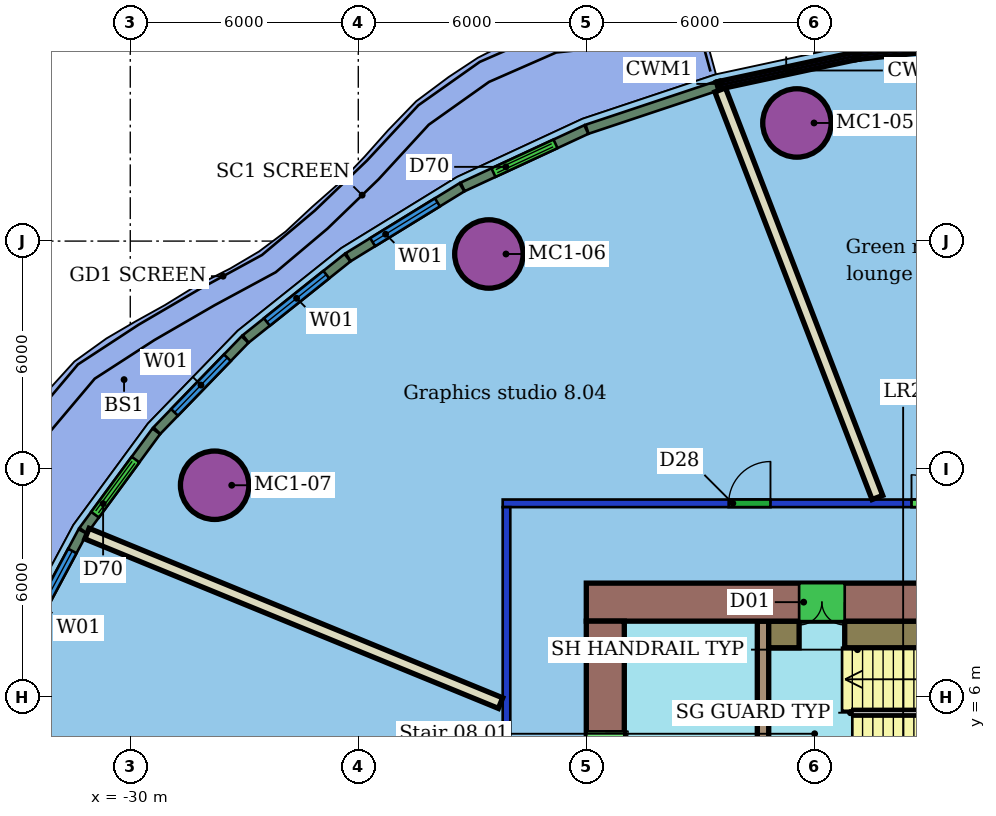
"""IFC4 building model, lengths in metres.
Left out: names, types, materials, properties, quantities, classifications, styles, units other than length and angle.
Written with IfcOpenShell. Run it as: python <this file> out.ifc"""

import sys

from ifc_helpers import new_model, si_unit, direction, frame, frame_2d, origin, origin_2d, place, context, subcontext, project, spatial, rectangle, hollow_circle, extrude, element, fill, save


model = new_model("IFC4")
c1 = context("Model", 3, precision=1e-05, world=origin(), true_north=direction((0.0, 1.0)))
c2 = subcontext(c1, "Body", "Model", "MODEL_VIEW")
j1 = project(units=[si_unit("LENGTHUNIT", "METRE"), si_unit("PLANEANGLEUNIT", "RADIAN")], contexts=[c1])
p1 = place(None, origin())
s1 = spatial("IfcSite", under=j1, at=p1, CompositionType="ELEMENT")
p2 = place(p1, origin())
s2 = spatial("IfcBuilding", under=s1, at=p2, CompositionType="ELEMENT")
p3 = place(p2, frame((0.0, 0.0, 47.1)))
s3 = spatial("IfcBuildingStorey", under=s2, at=p3, CompositionType="ELEMENT", Elevation=47.1)
for number, where, z_axis, x_axis in (
    (1, (-12.458, 21.108, 0.0), (0.0, 0.0, 1.0), (1.0, 0.0, 0.0)),
    (2, (-20.563, 17.66, 0.0), (0.0, 0.0, 1.0), (1.0, 0.0, 0.0)),
    (3, (-27.78, 11.576, 0.0), (0.0, 0.0, 1.0), (1.0, 0.0, 0.0)),
):
    element("IfcColumn", number, at=place(p3, frame(where, z_axis=z_axis, x_axis=x_axis)), inside=s3, PredefinedType="COLUMN", context=c2, shape_type="SweptSolid", body=[
        extrude(hollow_circle(Radius=0.9, WallThickness=0.06, at=origin_2d()), origin(), (0.0, 0.0, 1.0), 3.55),
    ])
p4 = place(p3, frame((-20.1, -11.0, 0.0), z_axis=(0.0, 0.0, 1.0), x_axis=(0.0, 1.0, 0.0)))
e4 = element("IfcWall", 4, at=p4, inside=s3, PredefinedType="PARTITIONING", context=c2, shape_type="SweptSolid", body=[
    extrude(rectangle(XDim=22.0, YDim=0.2, at=frame_2d((11.0, 0.0))), origin(), (0.0, 0.0, 1.0), 2.85),
])
p5 = place(p4, frame((8.49, 0.0, 0.0)))
e5 = element("IfcOpeningElement", 5, at=p5, cuts=e4, PredefinedType="OPENING", context=c2, shape_type="SweptSolid", body=[
    extrude(rectangle(XDim=1.8, YDim=2.1, at=frame_2d((0.9, 1.05))), frame((0.0, 0.11, 0.0), z_axis=(0.0, -1.0, 0.0), x_axis=(1.0, 0.0, 0.0)), (0.0, 0.0, 1.0), 0.22),
])
p6 = place(p4, frame((3.146, 0.0, 0.0)))
e6 = element("IfcOpeningElement", 6, at=p6, cuts=e4, PredefinedType="OPENING", context=c2, shape_type="SweptSolid", body=[
    extrude(rectangle(XDim=1.1, YDim=2.1, at=frame_2d((0.55, 1.05))), frame((0.0, 0.11, 0.0), z_axis=(0.0, -1.0, 0.0), x_axis=(1.0, 0.0, 0.0)), (0.0, 0.0, 1.0), 0.22),
])
p7 = place(p3, frame((-20.2, 11.1, 0.0), z_axis=(0.0, 0.0, 1.0), x_axis=(1.0, 0.0, 0.0)))
e7 = element("IfcWall", 7, at=p7, inside=s3, PredefinedType="PARTITIONING", context=c2, shape_type="SweptSolid", body=[
    extrude(rectangle(XDim=28.4, YDim=0.2, at=frame_2d((14.2, 0.0))), origin(), (0.0, 0.0, 1.0), 2.85),
])
p8 = place(p7, frame((19.669, 0.0, 0.0)))
e8 = element("IfcOpeningElement", 8, at=p8, cuts=e7, PredefinedType="OPENING", context=c2, shape_type="SweptSolid", body=[
    extrude(rectangle(XDim=1.2, YDim=2.1, at=frame_2d((0.6, 1.05))), frame((0.0, 0.11, 0.0), z_axis=(0.0, -1.0, 0.0), x_axis=(1.0, 0.0, 0.0)), (0.0, 0.0, 1.0), 0.22),
])
p9 = place(p7, frame((10.757, 0.0, 0.0)))
e9 = element("IfcOpeningElement", 9, at=p9, cuts=e7, PredefinedType="OPENING", context=c2, shape_type="SweptSolid", body=[
    extrude(rectangle(XDim=1.5, YDim=2.1, at=frame_2d((0.75, 1.05))), frame((0.0, 0.11, 0.0), z_axis=(0.0, -1.0, 0.0), x_axis=(1.0, 0.0, 0.0)), (0.0, 0.0, 1.0), 0.22),
])
p10 = place(p7, frame((5.946, 0.0, 0.0)))
e10 = element("IfcOpeningElement", 10, at=p10, cuts=e7, PredefinedType="OPENING", context=c2, shape_type="SweptSolid", body=[
    extrude(rectangle(XDim=1.1, YDim=2.1, at=frame_2d((0.55, 1.05))), frame((0.0, 0.11, 0.0), z_axis=(0.0, -1.0, 0.0), x_axis=(1.0, 0.0, 0.0)), (0.0, 0.0, 1.0), 0.22),
])
p11 = place(p3, frame((-14.477, 21.979, 0.0), z_axis=(0.0, 0.0, 1.0), x_axis=(0.359841429266, -0.933013475671, 0.0)))
e11 = element("IfcWall", 11, at=p11, inside=s3, PredefinedType="PARTITIONING", context=c2, shape_type="SweptSolid", body=[
    extrude(rectangle(XDim=11.495, YDim=0.3, at=frame_2d((5.747, 0.0))), origin(), (0.0, 0.0, 1.0), 3.55),
])
p12 = place(p3, frame((-31.139, 10.303, 0.0), z_axis=(0.0, 0.0, 1.0), x_axis=(0.925302392071, -0.379230119093, 0.0)))
e12 = element("IfcWall", 12, at=p12, inside=s3, PredefinedType="PARTITIONING", context=c2, shape_type="SweptSolid", body=[
    extrude(rectangle(XDim=11.76, YDim=0.3, at=frame_2d((5.88, 0.0))), origin(), (0.0, 0.0, 1.0), 3.55),
])
p13 = place(p3, frame((-14.562, 22.082, 0.0), z_axis=(0.0, 0.0, 1.0), x_axis=(-0.948744266755, -0.316044801096, 0.0)))
e13 = element("IfcWall", 13, at=p13, inside=s3, PredefinedType="SOLIDWALL", context=c2, shape_type="SweptSolid", body=[
    extrude(rectangle(XDim=3.603, YDim=0.25, at=frame_2d((1.801, 0.0))), origin(), (0.0, 0.0, 1.0), 3.15),
])
p14 = place(p3, frame((-18.0, 20.935, 0.0), z_axis=(0.0, 0.0, 1.0), x_axis=(-0.90717882077, -0.420745275845, 0.0)))
e14 = element("IfcWall", 14, at=p14, inside=s3, PredefinedType="SOLIDWALL", context=c2, shape_type="SweptSolid", body=[
    extrude(rectangle(XDim=3.587, YDim=0.25, at=frame_2d((1.793, 0.0))), origin(), (0.0, 0.0, 1.0), 3.15),
])
p15 = place(p14, frame((0.893, 0.0, 0.0)))
e15 = element("IfcOpeningElement", 15, at=p15, cuts=e14, PredefinedType="OPENING", context=c2, shape_type="SweptSolid", body=[
    extrude(rectangle(XDim=1.8, YDim=2.4, at=frame_2d((0.9, 1.2))), frame((0.0, 0.135, 0.0), z_axis=(0.0, -1.0, 0.0), x_axis=(1.0, 0.0, 0.0)), (0.0, 0.0, 1.0), 0.27),
])
p16 = place(p3, frame((-21.274, 19.415, 0.0), z_axis=(0.0, 0.0, 1.0), x_axis=(-0.851885012521, -0.523728866344, 0.0)))
e16 = element("IfcWall", 16, at=p16, inside=s3, PredefinedType="SOLIDWALL", context=c2, shape_type="SweptSolid", body=[
    extrude(rectangle(XDim=3.511, YDim=0.25, at=frame_2d((1.756, 0.0))), origin(), (0.0, 0.0, 1.0), 3.15),
])
p17 = place(p16, frame((0.756, 0.0, 0.8)))
e17 = element("IfcOpeningElement", 17, at=p17, cuts=e16, PredefinedType="OPENING", context=c2, shape_type="SweptSolid", body=[
    extrude(rectangle(XDim=2.0, YDim=2.2, at=frame_2d((1.0, 1.1))), frame((0.0, 0.135, 0.0), z_axis=(0.0, -1.0, 0.0), x_axis=(1.0, 0.0, 0.0)), (0.0, 0.0, 1.0), 0.27),
])
p18 = place(p3, frame((-24.284, 17.562, 0.0), z_axis=(0.0, 0.0, 1.0), x_axis=(-0.78173709479, -0.623608141888, 0.0)))
e18 = element("IfcWall", 18, at=p18, inside=s3, PredefinedType="SOLIDWALL", context=c2, shape_type="SweptSolid", body=[
    extrude(rectangle(XDim=3.426, YDim=0.25, at=frame_2d((1.713, 0.0))), origin(), (0.0, 0.0, 1.0), 3.15),
])
p19 = place(p18, frame((0.713, 0.0, 0.8)))
e19 = element("IfcOpeningElement", 19, at=p19, cuts=e18, PredefinedType="OPENING", context=c2, shape_type="SweptSolid", body=[
    extrude(rectangle(XDim=2.0, YDim=2.2, at=frame_2d((1.0, 1.1))), frame((0.0, 0.135, 0.0), z_axis=(0.0, -1.0, 0.0), x_axis=(1.0, 0.0, 0.0)), (0.0, 0.0, 1.0), 0.27),
])
p20 = place(p3, frame((-26.98, 15.41, 0.0), z_axis=(0.0, 0.0, 1.0), x_axis=(-0.695444598624, -0.718579717391, 0.0)))
e20 = element("IfcWall", 20, at=p20, inside=s3, PredefinedType="SOLIDWALL", context=c2, shape_type="SweptSolid", body=[
    extrude(rectangle(XDim=3.335, YDim=0.25, at=frame_2d((1.667, 0.0))), origin(), (0.0, 0.0, 1.0), 3.15),
])
p21 = place(p20, frame((0.667, 0.0, 0.8)))
e21 = element("IfcOpeningElement", 21, at=p21, cuts=e20, PredefinedType="OPENING", context=c2, shape_type="SweptSolid", body=[
    extrude(rectangle(XDim=2.0, YDim=2.2, at=frame_2d((1.0, 1.1))), frame((0.0, 0.135, 0.0), z_axis=(0.0, -1.0, 0.0), x_axis=(1.0, 0.0, 0.0)), (0.0, 0.0, 1.0), 0.27),
])
p22 = place(p3, frame((-29.316, 12.994, 0.0), z_axis=(0.0, 0.0, 1.0), x_axis=(-0.592218050456, -0.805777748957, 0.0)))
e22 = element("IfcWall", 22, at=p22, inside=s3, PredefinedType="SOLIDWALL", context=c2, shape_type="SweptSolid", body=[
    extrude(rectangle(XDim=3.244, YDim=0.25, at=frame_2d((1.622, 0.0))), origin(), (0.0, 0.0, 1.0), 3.15),
])
p23 = place(p22, frame((0.922, 0.0, 0.0)))
e23 = element("IfcOpeningElement", 23, at=p23, cuts=e22, PredefinedType="OPENING", context=c2, shape_type="SweptSolid", body=[
    extrude(rectangle(XDim=1.8, YDim=2.4, at=frame_2d((0.9, 1.2))), frame((0.0, 0.135, 0.0), z_axis=(0.0, -1.0, 0.0), x_axis=(1.0, 0.0, 0.0)), (0.0, 0.0, 1.0), 0.27),
])
p24 = place(p3, frame((-31.251, 10.358, 0.0), z_axis=(0.0, 0.0, 1.0), x_axis=(-0.47194273939, -0.88162920252, 0.0)))
e24 = element("IfcWall", 24, at=p24, inside=s3, PredefinedType="SOLIDWALL", context=c2, shape_type="SweptSolid", body=[
    extrude(rectangle(XDim=3.161, YDim=0.25, at=frame_2d((1.58, 0.0))), origin(), (0.0, 0.0, 1.0), 3.15),
])
p25 = place(p24, frame((0.58, 0.0, 0.8)))
e25 = element("IfcOpeningElement", 25, at=p25, cuts=e24, PredefinedType="OPENING", context=c2, shape_type="SweptSolid", body=[
    extrude(rectangle(XDim=2.0, YDim=2.2, at=frame_2d((1.0, 1.1))), frame((0.0, 0.135, 0.0), z_axis=(0.0, -1.0, 0.0), x_axis=(1.0, 0.0, 0.0)), (0.0, 0.0, 1.0), 0.27),
])
p26 = place(p3, frame((-6.0, 8.5, 0.0), z_axis=(0.0, 0.0, 1.0), x_axis=(-1.0, 0.0, 0.0)))
e26 = element("IfcWall", 26, at=p26, inside=s3, PredefinedType="SHEAR", context=c2, shape_type="SweptSolid", body=[
    extrude(rectangle(XDim=12.0, YDim=1.0, at=frame_2d((6.0, 0.0))), origin(), (0.0, 0.0, 1.0), 3.4),
])
p27 = place(p26, frame((5.2, 0.0, 0.0)))
e27 = element("IfcOpeningElement", 27, at=p27, cuts=e26, PredefinedType="OPENING", context=c2, shape_type="SweptSolid", body=[
    extrude(rectangle(XDim=1.2, YDim=2.1, at=frame_2d((0.6, 1.05))), frame((0.0, 0.51, 0.0), z_axis=(0.0, -1.0, 0.0), x_axis=(1.0, 0.0, 0.0)), (0.0, 0.0, 1.0), 1.02),
])
p28 = place(p3, frame((-17.5, 8.0, 0.0), z_axis=(0.0, 0.0, 1.0), x_axis=(0.0, -1.0, 0.0)))
e28 = element("IfcWall", 28, at=p28, inside=s3, PredefinedType="SHEAR", context=c2, shape_type="SweptSolid", body=[
    extrude(rectangle(XDim=16.0, YDim=1.0, at=frame_2d((8.0, 0.0))), origin(), (0.0, 0.0, 1.0), 3.4),
])
p29 = place(p28, frame((11.9, 0.0, 0.0)))
e29 = element("IfcOpeningElement", 29, at=p29, cuts=e28, PredefinedType="OPENING", context=c2, shape_type="SweptSolid", body=[
    extrude(rectangle(XDim=1.2, YDim=2.1, at=frame_2d((0.6, 1.05))), frame((0.0, 0.51, 0.0), z_axis=(0.0, -1.0, 0.0), x_axis=(1.0, 0.0, 0.0)), (0.0, 0.0, 1.0), 1.02),
])
p30 = place(p28, frame((2.9, 0.0, 0.0)))
e30 = element("IfcOpeningElement", 30, at=p30, cuts=e28, PredefinedType="OPENING", context=c2, shape_type="SweptSolid", body=[
    extrude(rectangle(XDim=1.2, YDim=2.1, at=frame_2d((0.6, 1.05))), frame((0.0, 0.51, 0.0), z_axis=(0.0, -1.0, 0.0), x_axis=(1.0, 0.0, 0.0)), (0.0, 0.0, 1.0), 1.02),
])
p31 = place(p3, frame((-13.35, 8.0, 0.0), z_axis=(0.0, 0.0, 1.0), x_axis=(0.0, -1.0, 0.0)))
e31 = element("IfcWall", 31, at=p31, inside=s3, PredefinedType="SHEAR", context=c2, shape_type="SweptSolid", body=[
    extrude(rectangle(XDim=16.0, YDim=0.3, at=frame_2d((8.0, 0.0))), origin(), (0.0, 0.0, 1.0), 3.4),
])
p32 = place(p31, frame((7.25, 0.0, 0.0)))
e32 = element("IfcOpeningElement", 32, at=p32, cuts=e31, PredefinedType="OPENING", context=c2, shape_type="SweptSolid", body=[
    extrude(rectangle(XDim=1.5, YDim=2.1, at=frame_2d((0.75, 1.05))), frame((0.0, 0.16, 0.0), z_axis=(0.0, -1.0, 0.0), x_axis=(1.0, 0.0, 0.0)), (0.0, 0.0, 1.0), 0.32),
])
p33 = place(p3, frame((-13.2, 7.65, 0.0), z_axis=(0.0, 0.0, 1.0), x_axis=(1.0, 0.0, 0.0)))
e33 = element("IfcWall", 33, at=p33, inside=s3, PredefinedType="SHEAR", context=c2, shape_type="SweptSolid", body=[
    extrude(rectangle(XDim=0.8, YDim=0.7, at=frame_2d((0.4, 0.0))), origin(), (0.0, 0.0, 1.0), 3.4),
])
p34 = place(p3, frame((-11.2, 7.65, 0.0), z_axis=(0.0, 0.0, 1.0), x_axis=(1.0, 0.0, 0.0)))
e34 = element("IfcWall", 34, at=p34, inside=s3, PredefinedType="SHEAR", context=c2, shape_type="SweptSolid", body=[
    extrude(rectangle(XDim=5.05, YDim=0.7, at=frame_2d((2.525, 0.0))), origin(), (0.0, 0.0, 1.0), 3.4),
])
p35 = place(p9, origin())
e35 = element("IfcDoor", 35, at=p35, inside=s3, OperationType="DOUBLE_DOOR_SINGLE_SWING", PredefinedType="DOOR", context=c2, shape_type="SweptSolid", body=[
    extrude(rectangle(XDim=1.5, YDim=2.1, at=frame_2d((0.75, 1.05))), frame((0.0, 0.025, 0.0), z_axis=(0.0, -1.0, 0.0), x_axis=(1.0, 0.0, 0.0)), (0.0, 0.0, 1.0), 0.05),
])
fill(e9, e35)
p36 = place(p10, origin())
e36 = element("IfcDoor", 36, at=p36, inside=s3, OperationType="SINGLE_SWING_RIGHT", PredefinedType="DOOR", context=c2, shape_type="SweptSolid", body=[
    extrude(rectangle(XDim=1.1, YDim=2.1, at=frame_2d((0.55, 1.05))), frame((0.0, 0.025, 0.0), z_axis=(0.0, -1.0, 0.0), x_axis=(1.0, 0.0, 0.0)), (0.0, 0.0, 1.0), 0.05),
])
fill(e10, e36)
p37 = place(p15, origin())
e37 = element("IfcDoor", 37, at=p37, inside=s3, OperationType="DOUBLE_DOOR_SLIDING", PredefinedType="DOOR", context=c2, shape_type="SweptSolid", body=[
    extrude(rectangle(XDim=1.8, YDim=2.4, at=frame_2d((0.9, 1.2))), frame((0.0, 0.025, 0.0), z_axis=(0.0, -1.0, 0.0), x_axis=(1.0, 0.0, 0.0)), (0.0, 0.0, 1.0), 0.05),
])
fill(e15, e37)
p38 = place(p17, origin())
e38 = element("IfcWindow", 38, at=p38, inside=s3, PartitioningType="SINGLE_PANEL", PredefinedType="WINDOW", context=c2, shape_type="SweptSolid", body=[
    extrude(rectangle(XDim=2.0, YDim=2.2, at=frame_2d((1.0, 1.1))), frame((0.0, 0.03, 0.0), z_axis=(0.0, -1.0, 0.0), x_axis=(1.0, 0.0, 0.0)), (0.0, 0.0, 1.0), 0.06),
])
fill(e17, e38)
p39 = place(p19, origin())
e39 = element("IfcWindow", 39, at=p39, inside=s3, PartitioningType="SINGLE_PANEL", PredefinedType="WINDOW", context=c2, shape_type="SweptSolid", body=[
    extrude(rectangle(XDim=2.0, YDim=2.2, at=frame_2d((1.0, 1.1))), frame((0.0, 0.03, 0.0), z_axis=(0.0, -1.0, 0.0), x_axis=(1.0, 0.0, 0.0)), (0.0, 0.0, 1.0), 0.06),
])
fill(e19, e39)
p40 = place(p21, origin())
e40 = element("IfcWindow", 40, at=p40, inside=s3, PartitioningType="SINGLE_PANEL", PredefinedType="WINDOW", context=c2, shape_type="SweptSolid", body=[
    extrude(rectangle(XDim=2.0, YDim=2.2, at=frame_2d((1.0, 1.1))), frame((0.0, 0.03, 0.0), z_axis=(0.0, -1.0, 0.0), x_axis=(1.0, 0.0, 0.0)), (0.0, 0.0, 1.0), 0.06),
])
fill(e21, e40)
p41 = place(p23, origin())
e41 = element("IfcDoor", 41, at=p41, inside=s3, OperationType="DOUBLE_DOOR_SLIDING", PredefinedType="DOOR", context=c2, shape_type="SweptSolid", body=[
    extrude(rectangle(XDim=1.8, YDim=2.4, at=frame_2d((0.9, 1.2))), frame((0.0, 0.025, 0.0), z_axis=(0.0, -1.0, 0.0), x_axis=(1.0, 0.0, 0.0)), (0.0, 0.0, 1.0), 0.05),
])
fill(e23, e41)
p42 = place(p25, origin())
e42 = element("IfcWindow", 42, at=p42, inside=s3, PartitioningType="SINGLE_PANEL", PredefinedType="WINDOW", context=c2, shape_type="SweptSolid", body=[
    extrude(rectangle(XDim=2.0, YDim=2.2, at=frame_2d((1.0, 1.1))), frame((0.0, 0.03, 0.0), z_axis=(0.0, -1.0, 0.0), x_axis=(1.0, 0.0, 0.0)), (0.0, 0.0, 1.0), 0.06),
])
fill(e25, e42)
p43 = place(p27, origin())
e43 = element("IfcDoor", 43, at=p43, inside=s3, OperationType="DOUBLE_DOOR_SINGLE_SWING", PredefinedType="NOTDEFINED", context=c2, shape_type="SweptSolid", body=[
    extrude(rectangle(XDim=1.2, YDim=2.1, at=frame_2d((0.6, 1.05))), frame((0.0, 0.025, 0.0), z_axis=(0.0, -1.0, 0.0), x_axis=(1.0, 0.0, 0.0)), (0.0, 0.0, 1.0), 0.05),
])
fill(e27, e43)
p44 = place(p30, origin())
e44 = element("IfcDoor", 44, at=p44, inside=s3, OperationType="DOUBLE_DOOR_SINGLE_SWING", PredefinedType="NOTDEFINED", context=c2, shape_type="SweptSolid", body=[
    extrude(rectangle(XDim=1.2, YDim=2.1, at=frame_2d((0.6, 1.05))), frame((0.0, 0.025, 0.0), z_axis=(0.0, -1.0, 0.0), x_axis=(1.0, 0.0, 0.0)), (0.0, 0.0, 1.0), 0.05),
])
fill(e30, e44)
save(model, sys.argv[1])
